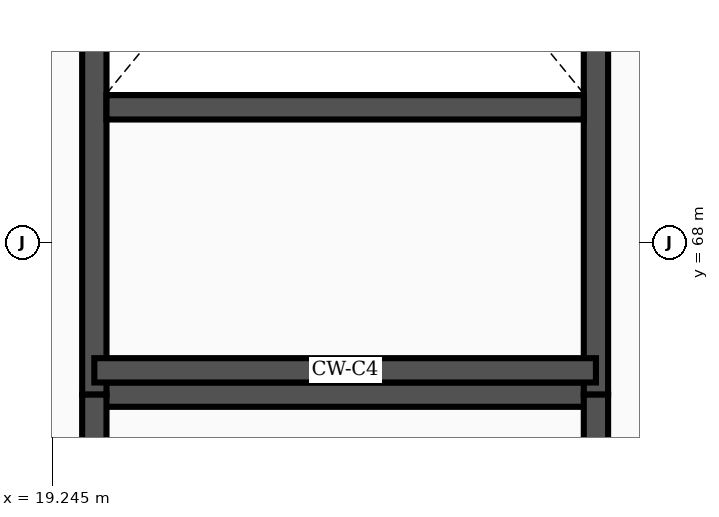
"""IFC4 building model, lengths in metres.
Left out: names, types, materials, properties, quantities, classifications, styles, units other than length and angle.
Written with IfcOpenShell. Run it as: python <this file> out.ifc"""

import sys

from ifc_helpers import new_model, si_unit, direction, frame, frame_2d, origin, place, context, subcontext, project, spatial, rectangle, extrude, element, save


model = new_model("IFC4")
c1 = context("Model", 3, precision=1e-05, world=origin(), true_north=direction((0.0, 1.0)))
c2 = subcontext(c1, "Body", "Model", "MODEL_VIEW")
j1 = project(units=[si_unit("LENGTHUNIT", "METRE"), si_unit("PLANEANGLEUNIT", "RADIAN")], contexts=[c1])
p1 = place(None, origin())
s1 = spatial("IfcSite", under=j1, at=p1, CompositionType="ELEMENT")
p2 = place(p1, origin())
s2 = spatial("IfcBuilding", under=s1, at=p2, CompositionType="ELEMENT")
p3 = place(p2, frame((0.0, 0.0, 33.3)))
s3 = spatial("IfcBuildingStorey", under=s2, at=p3, CompositionType="ELEMENT", Elevation=33.3)
p4 = place(p3, frame((19.8, 66.0, 0.0), z_axis=(0.0, 0.0, 1.0), x_axis=(1.0, 0.0, 0.0)))
e1 = element("IfcWall", 1, at=p4, inside=s3, PredefinedType="SHEAR", context=c2, shape_type="SweptSolid", body=[
    extrude(rectangle(XDim=6.6, YDim=0.32, at=frame_2d((3.3, 0.0))), origin(), (0.0, 0.0, 1.0), 4.255),
])
p5 = place(p3, frame((19.8, 66.0, 0.0), z_axis=(0.0, 0.0, 1.0), x_axis=(0.0, 1.0, 0.0)))
e2 = element("IfcWall", 2, at=p5, inside=s3, PredefinedType="SHEAR", context=c2, shape_type="SweptSolid", body=[
    extrude(rectangle(XDim=14.6, YDim=0.32, at=frame_2d((7.3, 0.0))), origin(), (0.0, 0.0, 1.0), 4.255),
])
p6 = place(p5, frame((11.65, 0.0, 0.0)))
e3 = element("IfcOpeningElement", 3, at=p6, cuts=e2, PredefinedType="OPENING", context=c2, shape_type="SweptSolid", body=[
    extrude(rectangle(XDim=2.4, YDim=2.25, at=frame_2d((1.2, 1.125))), frame((0.0, 0.172, 0.0), z_axis=(0.0, -1.0, 0.0), x_axis=(1.0, 0.0, 0.0)), (0.0, 0.0, 1.0), 0.344),
])
p7 = place(p3, frame((26.4, 66.0, 0.0), z_axis=(0.0, 0.0, 1.0), x_axis=(0.0, 1.0, 0.0)))
e4 = element("IfcWall", 4, at=p7, inside=s3, PredefinedType="SHEAR", context=c2, shape_type="SweptSolid", body=[
    extrude(rectangle(XDim=14.6, YDim=0.32, at=frame_2d((7.3, 0.0))), origin(), (0.0, 0.0, 1.0), 4.255),
])
p8 = place(p3, frame((19.96, 69.78, 0.0), z_axis=(0.0, 0.0, 1.0), x_axis=(1.0, 0.0, 0.0)))
e5 = element("IfcWall", 5, at=p8, inside=s3, PredefinedType="SHEAR", context=c2, shape_type="SweptSolid", body=[
    extrude(rectangle(XDim=6.28, YDim=0.32, at=frame_2d((3.14, 0.0))), origin(), (0.0, 0.0, 1.0), 4.255),
])
p9 = place(p3, frame((19.8, 66.32, 0.0), z_axis=(0.0, 0.0, 1.0), x_axis=(1.0, 0.0, 0.0)))
e6 = element("IfcWall", 6, at=p9, inside=s3, PredefinedType="SHEAR", context=c2, shape_type="SweptSolid", body=[
    extrude(rectangle(XDim=6.6, YDim=0.32, at=frame_2d((3.3, 0.0))), origin(), (0.0, 0.0, 1.0), 4.255),
])
p10 = place(p3, frame((19.8, 54.0, 0.0), z_axis=(0.0, 0.0, 1.0), x_axis=(0.0, 1.0, 0.0)))
e7 = element("IfcWall", 7, at=p10, inside=s3, PredefinedType="SHEAR", context=c2, shape_type="SweptSolid", body=[
    extrude(rectangle(XDim=12.0, YDim=0.32, at=frame_2d((6.0, 0.0))), origin(), (0.0, 0.0, 1.0), 4.255),
])
p11 = place(p10, frame((0.55, 0.0, 0.0)))
e8 = element("IfcOpeningElement", 8, at=p11, cuts=e7, PredefinedType="OPENING", context=c2, shape_type="SweptSolid", body=[
    extrude(rectangle(XDim=2.4, YDim=2.25, at=frame_2d((1.2, 1.125))), frame((0.0, 0.172, 0.0), z_axis=(0.0, -1.0, 0.0), x_axis=(1.0, 0.0, 0.0)), (0.0, 0.0, 1.0), 0.344),
])
p12 = place(p3, frame((26.4, 54.0, 0.0), z_axis=(0.0, 0.0, 1.0), x_axis=(0.0, 1.0, 0.0)))
e9 = element("IfcWall", 9, at=p12, inside=s3, PredefinedType="SHEAR", context=c2, shape_type="SweptSolid", body=[
    extrude(rectangle(XDim=12.0, YDim=0.32, at=frame_2d((6.0, 0.0))), origin(), (0.0, 0.0, 1.0), 4.255),
])
save(model, sys.argv[1])
